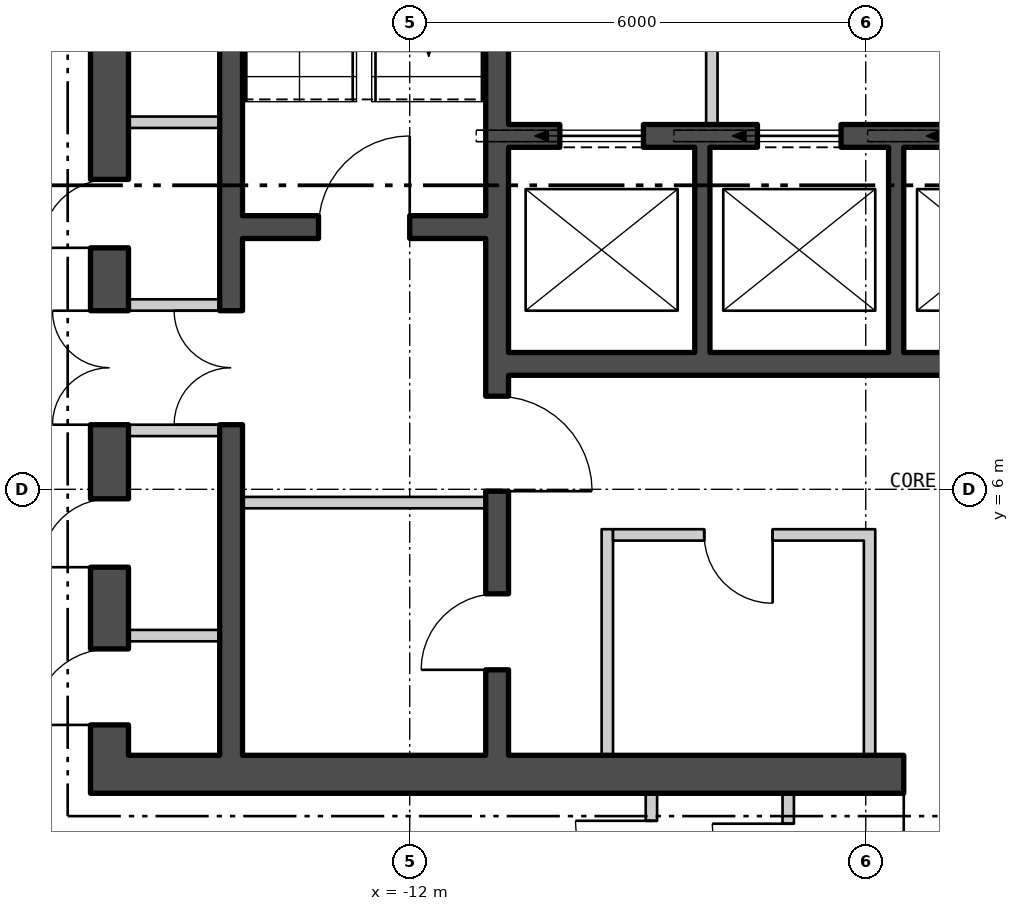
"""IFC4 building model, lengths in metres.
Left out: names, types, materials, properties, quantities, classifications, styles, units other than length and angle.
Written with IfcOpenShell. Run it as: python <this file> out.ifc"""

import sys

from ifc_helpers import new_model, si_unit, direction, frame, frame_2d, origin, place, context, subcontext, project, spatial, polyline, rectangle, outline, extrude, element, fill, save


model = new_model("IFC4")
c1 = context("Model", 3, precision=1e-05, world=origin(), true_north=direction((0.0, 1.0)))
c2 = subcontext(c1, "Body", "Model", "MODEL_VIEW")
j1 = project(units=[si_unit("LENGTHUNIT", "METRE"), si_unit("PLANEANGLEUNIT", "RADIAN")], contexts=[c1])
p1 = place(None, origin())
s1 = spatial("IfcSite", under=j1, at=p1, CompositionType="ELEMENT")
p2 = place(p1, origin())
s2 = spatial("IfcBuilding", under=s1, at=p2, CompositionType="ELEMENT")
p3 = place(p2, frame((0.0, 0.0, 174.9)))
s3 = spatial("IfcBuildingStorey", under=s2, at=p3, CompositionType="ELEMENT", Elevation=174.9)
p4 = place(p3, frame((-26.775, 13.22, -0.18), z_axis=(0.0, 0.0, 1.0), x_axis=(0.500000335318, -0.866025210188, 0.0)))
e1 = element("IfcWall", 1, at=p4, inside=s3, PredefinedType="SOLIDWALL", context=c2, shape_type="SweptSolid", body=[
    extrude(outline(polyline([(-0.13, -0.225), (45.88, -0.225), (45.62, 0.225), (0.13, 0.225), (-0.13, -0.225)])), origin(), (0.0, 0.0, 1.0), 3.68),
])
p5 = place(p4, frame((1.425, 0.0, 1.08)))
e2 = element("IfcOpeningElement", 2, at=p5, cuts=e1, PredefinedType="OPENING", context=c2, shape_type="SweptSolid", body=[
    extrude(rectangle(XDim=2.4, YDim=2.0, at=frame_2d((1.2, 1.0))), frame((0.0, 0.235, 0.0), z_axis=(0.0, -1.0, 0.0), x_axis=(1.0, 0.0, 0.0)), (0.0, 0.0, 1.0), 0.47),
])
p6 = place(p4, frame((5.895, 0.0, 1.08)))
e3 = element("IfcOpeningElement", 3, at=p6, cuts=e1, PredefinedType="OPENING", context=c2, shape_type="SweptSolid", body=[
    extrude(rectangle(XDim=2.4, YDim=2.0, at=frame_2d((1.2, 1.0))), frame((0.0, 0.235, 0.0), z_axis=(0.0, -1.0, 0.0), x_axis=(1.0, 0.0, 0.0)), (0.0, 0.0, 1.0), 0.47),
])
p7 = place(p4, frame((10.403, 0.0, 1.08)))
e4 = element("IfcOpeningElement", 4, at=p7, cuts=e1, PredefinedType="OPENING", context=c2, shape_type="SweptSolid", body=[
    extrude(rectangle(XDim=2.4, YDim=2.0, at=frame_2d((1.2, 1.0))), frame((0.0, 0.235, 0.0), z_axis=(0.0, -1.0, 0.0), x_axis=(1.0, 0.0, 0.0)), (0.0, 0.0, 1.0), 0.47),
])
p8 = place(p4, frame((14.912, 0.0, 1.08)))
e5 = element("IfcOpeningElement", 5, at=p8, cuts=e1, PredefinedType="OPENING", context=c2, shape_type="SweptSolid", body=[
    extrude(rectangle(XDim=2.4, YDim=2.0, at=frame_2d((1.2, 1.0))), frame((0.0, 0.235, 0.0), z_axis=(0.0, -1.0, 0.0), x_axis=(1.0, 0.0, 0.0)), (0.0, 0.0, 1.0), 0.47),
])
p9 = place(p4, frame((19.421, 0.0, 1.08)))
e6 = element("IfcOpeningElement", 6, at=p9, cuts=e1, PredefinedType="OPENING", context=c2, shape_type="SweptSolid", body=[
    extrude(rectangle(XDim=2.4, YDim=2.0, at=frame_2d((1.2, 1.0))), frame((0.0, 0.235, 0.0), z_axis=(0.0, -1.0, 0.0), x_axis=(1.0, 0.0, 0.0)), (0.0, 0.0, 1.0), 0.47),
])
p10 = place(p4, frame((23.929, 0.0, 1.08)))
e7 = element("IfcOpeningElement", 7, at=p10, cuts=e1, PredefinedType="OPENING", context=c2, shape_type="SweptSolid", body=[
    extrude(rectangle(XDim=2.4, YDim=2.0, at=frame_2d((1.2, 1.0))), frame((0.0, 0.235, 0.0), z_axis=(0.0, -1.0, 0.0), x_axis=(1.0, 0.0, 0.0)), (0.0, 0.0, 1.0), 0.47),
])
p11 = place(p4, frame((28.438, 0.0, 1.08)))
e8 = element("IfcOpeningElement", 8, at=p11, cuts=e1, PredefinedType="OPENING", context=c2, shape_type="SweptSolid", body=[
    extrude(rectangle(XDim=2.4, YDim=2.0, at=frame_2d((1.2, 1.0))), frame((0.0, 0.235, 0.0), z_axis=(0.0, -1.0, 0.0), x_axis=(1.0, 0.0, 0.0)), (0.0, 0.0, 1.0), 0.47),
])
p12 = place(p4, frame((32.947, 0.0, 1.08)))
e9 = element("IfcOpeningElement", 9, at=p12, cuts=e1, PredefinedType="OPENING", context=c2, shape_type="SweptSolid", body=[
    extrude(rectangle(XDim=2.4, YDim=2.0, at=frame_2d((1.2, 1.0))), frame((0.0, 0.235, 0.0), z_axis=(0.0, -1.0, 0.0), x_axis=(1.0, 0.0, 0.0)), (0.0, 0.0, 1.0), 0.47),
])
p13 = place(p4, frame((37.455, 0.0, 1.08)))
e10 = element("IfcOpeningElement", 10, at=p13, cuts=e1, PredefinedType="OPENING", context=c2, shape_type="SweptSolid", body=[
    extrude(rectangle(XDim=2.4, YDim=2.0, at=frame_2d((1.2, 1.0))), frame((0.0, 0.235, 0.0), z_axis=(0.0, -1.0, 0.0), x_axis=(1.0, 0.0, 0.0)), (0.0, 0.0, 1.0), 0.47),
])
p14 = place(p4, frame((41.925, 0.0, 1.08)))
e11 = element("IfcOpeningElement", 11, at=p14, cuts=e1, PredefinedType="OPENING", context=c2, shape_type="SweptSolid", body=[
    extrude(rectangle(XDim=2.4, YDim=2.0, at=frame_2d((1.2, 1.0))), frame((0.0, 0.235, 0.0), z_axis=(0.0, -1.0, 0.0), x_axis=(1.0, 0.0, 0.0)), (0.0, 0.0, 1.0), 0.47),
])
p15 = place(p3, frame((-16.2, 2.25, 0.0), z_axis=(0.0, 0.0, 1.0), x_axis=(1.0, 0.0, 0.0)))
e12 = element("IfcWall", 12, at=p15, inside=s3, PredefinedType="SHEAR", context=c2, shape_type="SweptSolid", body=[
    extrude(rectangle(XDim=32.4, YDim=0.5, at=frame_2d((16.2, 0.0))), origin(), (0.0, 0.0, 1.0), 3.7),
])
p16 = place(p15, frame((10.7, 0.0, 0.0)))
e13 = element("IfcOpeningElement", 13, at=p16, cuts=e12, PredefinedType="OPENING", context=c2, shape_type="SweptSolid", body=[
    extrude(rectangle(XDim=1.8, YDim=2.4, at=frame_2d((0.9, 1.2))), frame((0.0, 0.26, 0.0), z_axis=(0.0, -1.0, 0.0), x_axis=(1.0, 0.0, 0.0)), (0.0, 0.0, 1.0), 0.52),
])
p17 = place(p15, frame((20.7, 0.0, 0.0)))
e14 = element("IfcOpeningElement", 14, at=p17, cuts=e12, PredefinedType="OPENING", context=c2, shape_type="SweptSolid", body=[
    extrude(rectangle(XDim=1.8, YDim=2.4, at=frame_2d((0.9, 1.2))), frame((0.0, 0.26, 0.0), z_axis=(0.0, -1.0, 0.0), x_axis=(1.0, 0.0, 0.0)), (0.0, 0.0, 1.0), 0.52),
])
p18 = place(p3, frame((-15.95, 2.5, 0.0), z_axis=(0.0, 0.0, 1.0), x_axis=(0.0, 1.0, 0.0)))
e15 = element("IfcWall", 15, at=p18, inside=s3, PredefinedType="SHEAR", context=c2, shape_type="SweptSolid", body=[
    extrude(rectangle(XDim=15.0, YDim=0.5, at=frame_2d((7.5, 0.0))), origin(), (0.0, 0.0, 1.0), 3.7),
])
p19 = place(p18, frame((4.35, 0.0, 0.0)))
e16 = element("IfcOpeningElement", 16, at=p19, cuts=e15, PredefinedType="OPENING", context=c2, shape_type="SweptSolid", body=[
    extrude(rectangle(XDim=1.5, YDim=2.1, at=frame_2d((0.75, 1.05))), frame((0.0, 0.26, 0.0), z_axis=(0.0, -1.0, 0.0), x_axis=(1.0, 0.0, 0.0)), (0.0, 0.0, 1.0), 0.52),
])
p20 = place(p18, frame((0.4, 0.0, 0.0)))
e17 = element("IfcOpeningElement", 17, at=p20, cuts=e15, PredefinedType="OPENING", context=c2, shape_type="SweptSolid", body=[
    extrude(rectangle(XDim=1.0, YDim=2.1, at=frame_2d((0.5, 1.05))), frame((0.0, 0.26, 0.0), z_axis=(0.0, -1.0, 0.0), x_axis=(1.0, 0.0, 0.0)), (0.0, 0.0, 1.0), 0.52),
])
p21 = place(p18, frame((2.475, 0.0, 0.0)))
e18 = element("IfcOpeningElement", 18, at=p21, cuts=e15, PredefinedType="OPENING", context=c2, shape_type="SweptSolid", body=[
    extrude(rectangle(XDim=0.9, YDim=2.1, at=frame_2d((0.45, 1.05))), frame((0.0, 0.26, 0.0), z_axis=(0.0, -1.0, 0.0), x_axis=(1.0, 0.0, 0.0)), (0.0, 0.0, 1.0), 0.52),
])
p22 = place(p18, frame((6.677, 0.0, 0.0)))
e19 = element("IfcOpeningElement", 19, at=p22, cuts=e15, PredefinedType="OPENING", context=c2, shape_type="SweptSolid", body=[
    extrude(rectangle(XDim=0.9, YDim=2.1, at=frame_2d((0.45, 1.05))), frame((0.0, 0.26, 0.0), z_axis=(0.0, -1.0, 0.0), x_axis=(1.0, 0.0, 0.0)), (0.0, 0.0, 1.0), 0.52),
])
p23 = place(p18, frame((11.252, 0.0, 0.0)))
e20 = element("IfcOpeningElement", 20, at=p23, cuts=e15, PredefinedType="OPENING", context=c2, shape_type="SweptSolid", body=[
    extrude(rectangle(XDim=0.9, YDim=2.1, at=frame_2d((0.45, 1.05))), frame((0.0, 0.26, 0.0), z_axis=(0.0, -1.0, 0.0), x_axis=(1.0, 0.0, 0.0)), (0.0, 0.0, 1.0), 0.52),
])
p24 = place(p3, frame((-10.85, 2.5, 0.0), z_axis=(0.0, 0.0, 1.0), x_axis=(0.0, 1.0, 0.0)))
e21 = element("IfcWall", 21, at=p24, inside=s3, PredefinedType="SHEAR", context=c2, shape_type="SweptSolid", body=[
    extrude(rectangle(XDim=15.0, YDim=0.3, at=frame_2d((7.5, 0.0))), origin(), (0.0, 0.0, 1.0), 3.7),
])
p25 = place(p24, frame((3.475, 0.0, 0.0)))
e22 = element("IfcOpeningElement", 22, at=p25, cuts=e21, PredefinedType="OPENING", context=c2, shape_type="SweptSolid", body=[
    extrude(rectangle(XDim=1.25, YDim=2.1, at=frame_2d((0.625, 1.05))), frame((0.0, 0.16, 0.0), z_axis=(0.0, -1.0, 0.0), x_axis=(1.0, 0.0, 0.0)), (0.0, 0.0, 1.0), 0.32),
])
p26 = place(p24, frame((1.125, 0.0, 0.0)))
e23 = element("IfcOpeningElement", 23, at=p26, cuts=e21, PredefinedType="OPENING", context=c2, shape_type="SweptSolid", body=[
    extrude(rectangle(XDim=1.0, YDim=2.1, at=frame_2d((0.5, 1.05))), frame((0.0, 0.16, 0.0), z_axis=(0.0, -1.0, 0.0), x_axis=(1.0, 0.0, 0.0)), (0.0, 0.0, 1.0), 0.32),
])
p27 = place(p3, frame((-14.35, 2.5, 0.0), z_axis=(0.0, 0.0, 1.0), x_axis=(0.0, 1.0, 0.0)))
e24 = element("IfcWall", 24, at=p27, inside=s3, PredefinedType="SHEAR", context=c2, shape_type="SweptSolid", body=[
    extrude(rectangle(XDim=15.0, YDim=0.3, at=frame_2d((7.5, 0.0))), origin(), (0.0, 0.0, 1.0), 3.7),
])
p28 = place(p27, frame((4.35, 0.0, 0.0)))
e25 = element("IfcOpeningElement", 25, at=p28, cuts=e24, PredefinedType="OPENING", context=c2, shape_type="SweptSolid", body=[
    extrude(rectangle(XDim=1.5, YDim=2.1, at=frame_2d((0.75, 1.05))), frame((0.0, 0.16, 0.0), z_axis=(0.0, -1.0, 0.0), x_axis=(1.0, 0.0, 0.0)), (0.0, 0.0, 1.0), 0.32),
])
p29 = place(p3, frame((-14.2, 9.45, 0.0), z_axis=(0.0, 0.0, 1.0), x_axis=(1.0, 0.0, 0.0)))
e26 = element("IfcWall", 26, at=p29, inside=s3, PredefinedType="SHEAR", context=c2, shape_type="SweptSolid", body=[
    extrude(rectangle(XDim=3.2, YDim=0.3, at=frame_2d((1.6, 0.0))), origin(), (0.0, 0.0, 1.0), 3.7),
])
p30 = place(p29, frame((1.0, 0.0, 0.0)))
e27 = element("IfcOpeningElement", 27, at=p30, cuts=e26, PredefinedType="OPENING", context=c2, shape_type="SweptSolid", body=[
    extrude(rectangle(XDim=1.2, YDim=2.1, at=frame_2d((0.6, 1.05))), frame((0.0, 0.16, 0.0), z_axis=(0.0, -1.0, 0.0), x_axis=(1.0, 0.0, 0.0)), (0.0, 0.0, 1.0), 0.32),
])
p31 = place(p3, frame((-10.7, 10.65, 0.0), z_axis=(0.0, 0.0, 1.0), x_axis=(1.0, 0.0, 0.0)))
e28 = element("IfcWall", 28, at=p31, inside=s3, PredefinedType="SHEAR", context=c2, shape_type="SweptSolid", body=[
    extrude(rectangle(XDim=10.3, YDim=0.3, at=frame_2d((5.15, 0.0))), origin(), (0.0, 0.0, 1.0), 3.7),
])
p32 = place(p31, frame((0.675, 0.0, 0.0)))
e29 = element("IfcOpeningElement", 29, at=p32, cuts=e28, PredefinedType="OPENING", context=c2, shape_type="SweptSolid", body=[
    extrude(rectangle(XDim=1.1, YDim=2.1, at=frame_2d((0.55, 1.05))), frame((0.0, 0.16, 0.0), z_axis=(0.0, -1.0, 0.0), x_axis=(1.0, 0.0, 0.0)), (0.0, 0.0, 1.0), 0.32),
])
p33 = place(p31, frame((3.275, 0.0, 0.0)))
e30 = element("IfcOpeningElement", 30, at=p33, cuts=e28, PredefinedType="OPENING", context=c2, shape_type="SweptSolid", body=[
    extrude(rectangle(XDim=1.1, YDim=2.1, at=frame_2d((0.55, 1.05))), frame((0.0, 0.16, 0.0), z_axis=(0.0, -1.0, 0.0), x_axis=(1.0, 0.0, 0.0)), (0.0, 0.0, 1.0), 0.32),
])
p34 = place(p31, frame((5.825, 0.0, 0.0)))
e31 = element("IfcOpeningElement", 31, at=p34, cuts=e28, PredefinedType="OPENING", context=c2, shape_type="SweptSolid", body=[
    extrude(rectangle(XDim=1.1, YDim=2.1, at=frame_2d((0.55, 1.05))), frame((0.0, 0.16, 0.0), z_axis=(0.0, -1.0, 0.0), x_axis=(1.0, 0.0, 0.0)), (0.0, 0.0, 1.0), 0.32),
])
p35 = place(p31, frame((8.425, 0.0, 0.0)))
e32 = element("IfcOpeningElement", 32, at=p35, cuts=e28, PredefinedType="OPENING", context=c2, shape_type="SweptSolid", body=[
    extrude(rectangle(XDim=1.0, YDim=2.1, at=frame_2d((0.5, 1.05))), frame((0.0, 0.16, 0.0), z_axis=(0.0, -1.0, 0.0), x_axis=(1.0, 0.0, 0.0)), (0.0, 0.0, 1.0), 0.32),
])
p36 = place(p3, frame((-10.7, 7.65, 0.0), z_axis=(0.0, 0.0, 1.0), x_axis=(1.0, 0.0, 0.0)))
e33 = element("IfcWall", 33, at=p36, inside=s3, PredefinedType="SHEAR", context=c2, shape_type="SweptSolid", body=[
    extrude(rectangle(XDim=10.3, YDim=0.3, at=frame_2d((5.15, 0.0))), origin(), (0.0, 0.0, 1.0), 3.7),
])
for number, where, z_axis, x_axis in (
    (34, (-8.15, 7.8, 0.0), (0.0, 0.0, 1.0), (0.0, 1.0, 0.0)),
    (35, (-5.6, 7.8, 0.0), (0.0, 0.0, 1.0), (0.0, 1.0, 0.0)),
):
    element("IfcWall", number, at=place(p3, frame(where, z_axis=z_axis, x_axis=x_axis)), inside=s3, PredefinedType="SHEAR", context=c2, shape_type="SweptSolid", body=[
        extrude(rectangle(XDim=2.7, YDim=0.2, at=frame_2d((1.35, 0.0))), origin(), (0.0, 0.0, 1.0), 3.7),
    ])
p37 = place(p3, frame((-8.025, 10.8, 0.0), z_axis=(0.0, 0.0, 1.0), x_axis=(0.0, 1.0, 0.0)))
e36 = element("IfcWall", 36, at=p37, inside=s3, PredefinedType="PARTITIONING", context=c2, shape_type="SweptSolid", body=[
    extrude(rectangle(XDim=3.6, YDim=0.15, at=frame_2d((1.8, 0.0))), origin(), (0.0, 0.0, 1.0), 3.7),
])
p38 = place(p37, frame((1.175, 0.0, 0.0)))
e37 = element("IfcOpeningElement", 37, at=p38, cuts=e36, PredefinedType="OPENING", context=c2, shape_type="SweptSolid", body=[
    extrude(rectangle(XDim=1.25, YDim=2.1, at=frame_2d((0.625, 1.05))), frame((0.0, 0.085, 0.0), z_axis=(0.0, -1.0, 0.0), x_axis=(1.0, 0.0, 0.0)), (0.0, 0.0, 1.0), 0.17),
])
p39 = place(p3, frame((-14.2, 5.825, 0.0), z_axis=(0.0, 0.0, 1.0), x_axis=(1.0, 0.0, 0.0)))
e38 = element("IfcWall", 38, at=p39, inside=s3, PredefinedType="PARTITIONING", context=c2, shape_type="SweptSolid", body=[
    extrude(rectangle(XDim=3.2, YDim=0.15, at=frame_2d((1.6, 0.0))), origin(), (0.0, 0.0, 1.0), 3.7),
])
for number, where, z_axis, x_axis in (
    (39, (-15.7, 6.775, 0.0), (0.0, 0.0, 1.0), (1.0, 0.0, 0.0)),
    (40, (-15.7, 8.425, 0.0), (0.0, 0.0, 1.0), (1.0, 0.0, 0.0)),
    (41, (-15.7, 4.075, 0.0), (0.0, 0.0, 1.0), (1.0, 0.0, 0.0)),
    (42, (-15.7, 10.829, 0.0), (0.0, 0.0, 1.0), (1.0, 0.0, 0.0)),
):
    element("IfcWall", number, at=place(p3, frame(where, z_axis=z_axis, x_axis=x_axis)), inside=s3, PredefinedType="PARTITIONING", context=c2, shape_type="SweptSolid", body=[
        extrude(rectangle(XDim=1.2, YDim=0.15, at=frame_2d((0.6, 0.0))), origin(), (0.0, 0.0, 1.0), 3.7),
    ])
for number, where, z_axis, x_axis in (
    (43, (-9.4, 2.5, 0.0), (0.0, 0.0, 1.0), (0.0, 1.0, 0.0)),
    (44, (-5.95, 2.5, 0.0), (0.0, 0.0, 1.0), (0.0, 1.0, 0.0)),
):
    element("IfcWall", number, at=place(p3, frame(where, z_axis=z_axis, x_axis=x_axis)), inside=s3, PredefinedType="PARTITIONING", context=c2, shape_type="SweptSolid", body=[
        extrude(rectangle(XDim=2.975, YDim=0.15, at=frame_2d((1.488, 0.0))), origin(), (0.0, 0.0, 1.0), 3.7),
    ])
p40 = place(p3, frame((-9.325, 5.4, 0.0), z_axis=(0.0, 0.0, 1.0), x_axis=(1.0, 0.0, 0.0)))
e45 = element("IfcWall", 45, at=p40, inside=s3, PredefinedType="PARTITIONING", context=c2, shape_type="SweptSolid", body=[
    extrude(rectangle(XDim=3.3, YDim=0.15, at=frame_2d((1.65, 0.0))), origin(), (0.0, 0.0, 1.0), 3.7),
])
p41 = place(p40, frame((1.2, 0.0, 0.0)))
e46 = element("IfcOpeningElement", 46, at=p41, cuts=e45, PredefinedType="OPENING", context=c2, shape_type="SweptSolid", body=[
    extrude(rectangle(XDim=0.9, YDim=2.1, at=frame_2d((0.45, 1.05))), frame((0.0, 0.085, 0.0), z_axis=(0.0, -1.0, 0.0), x_axis=(1.0, 0.0, 0.0)), (0.0, 0.0, 1.0), 0.17),
])
p42 = place(p3, frame((-8.82, 0.275, 0.0), z_axis=(0.0, 0.0, 1.0), x_axis=(0.0, 1.0, 0.0)))
e47 = element("IfcWall", 47, at=p42, inside=s3, PredefinedType="PARTITIONING", context=c2, shape_type="SweptSolid", body=[
    extrude(rectangle(XDim=1.725, YDim=0.15, at=frame_2d((0.863, 0.0))), origin(), (0.0, 0.0, 1.0), 3.7),
])
p43 = place(p42, frame((0.363, 0.0, 0.0)))
e48 = element("IfcOpeningElement", 48, at=p43, cuts=e47, PredefinedType="OPENING", context=c2, shape_type="SweptSolid", body=[
    extrude(rectangle(XDim=1.0, YDim=2.1, at=frame_2d((0.5, 1.05))), frame((0.0, 0.085, 0.0), z_axis=(0.0, -1.0, 0.0), x_axis=(1.0, 0.0, 0.0)), (0.0, 0.0, 1.0), 0.17),
])
p44 = place(p3, frame((-7.02, 0.2, 0.0), z_axis=(0.0, 0.0, 1.0), x_axis=(0.0, 1.0, 0.0)))
e49 = element("IfcWall", 49, at=p44, inside=s3, PredefinedType="PARTITIONING", context=c2, shape_type="SweptSolid", body=[
    extrude(rectangle(XDim=1.8, YDim=0.15, at=frame_2d((0.9, 0.0))), origin(), (0.0, 0.0, 1.0), 3.7),
])
p45 = place(p44, frame((0.4, 0.0, 0.0)))
e50 = element("IfcOpeningElement", 50, at=p45, cuts=e49, PredefinedType="OPENING", context=c2, shape_type="SweptSolid", body=[
    extrude(rectangle(XDim=1.0, YDim=2.1, at=frame_2d((0.5, 1.05))), frame((0.0, 0.085, 0.0), z_axis=(0.0, -1.0, 0.0), x_axis=(1.0, 0.0, 0.0)), (0.0, 0.0, 1.0), 0.17),
])
p46 = place(p32, origin())
e51 = element("IfcDoor", 51, at=p46, inside=s3, OperationType="SLIDING_TO_LEFT", PredefinedType="DOOR", context=c2, shape_type="SweptSolid", body=[
    extrude(rectangle(XDim=1.1, YDim=2.1, at=frame_2d((0.55, 1.05))), frame((0.0, 0.025, 0.0), z_axis=(0.0, -1.0, 0.0), x_axis=(1.0, 0.0, 0.0)), (0.0, 0.0, 1.0), 0.05),
])
fill(e29, e51)
p47 = place(p33, origin())
e52 = element("IfcDoor", 52, at=p47, inside=s3, OperationType="SLIDING_TO_LEFT", PredefinedType="DOOR", context=c2, shape_type="SweptSolid", body=[
    extrude(rectangle(XDim=1.1, YDim=2.1, at=frame_2d((0.55, 1.05))), frame((0.0, 0.025, 0.0), z_axis=(0.0, -1.0, 0.0), x_axis=(1.0, 0.0, 0.0)), (0.0, 0.0, 1.0), 0.05),
])
fill(e30, e52)
p48 = place(p30, origin())
e53 = element("IfcDoor", 53, at=p48, inside=s3, OperationType="SINGLE_SWING_LEFT", PredefinedType="DOOR", context=c2, shape_type="SweptSolid", body=[
    extrude(rectangle(XDim=1.2, YDim=2.1, at=frame_2d((0.6, 1.05))), frame((0.0, 0.025, 0.0), z_axis=(0.0, -1.0, 0.0), x_axis=(1.0, 0.0, 0.0)), (0.0, 0.0, 1.0), 0.05),
])
fill(e27, e53)
p49 = place(p25, origin())
e54 = element("IfcDoor", 54, at=p49, inside=s3, OperationType="SINGLE_SWING_LEFT", PredefinedType="DOOR", context=c2, shape_type="SweptSolid", body=[
    extrude(rectangle(XDim=1.25, YDim=2.1, at=frame_2d((0.625, 1.05))), frame((0.0, 0.025, 0.0), z_axis=(0.0, -1.0, 0.0), x_axis=(1.0, 0.0, 0.0)), (0.0, 0.0, 1.0), 0.05),
])
fill(e22, e54)
p50 = place(p26, origin())
e55 = element("IfcDoor", 55, at=p50, inside=s3, OperationType="SINGLE_SWING_RIGHT", PredefinedType="DOOR", context=c2, shape_type="SweptSolid", body=[
    extrude(rectangle(XDim=1.0, YDim=2.1, at=frame_2d((0.5, 1.05))), frame((0.0, 0.025, 0.0), z_axis=(0.0, -1.0, 0.0), x_axis=(1.0, 0.0, 0.0)), (0.0, 0.0, 1.0), 0.05),
])
fill(e23, e55)
p51 = place(p28, origin())
e56 = element("IfcDoor", 56, at=p51, inside=s3, OperationType="DOUBLE_DOOR_SINGLE_SWING", PredefinedType="DOOR", context=c2, shape_type="SweptSolid", body=[
    extrude(rectangle(XDim=1.5, YDim=2.1, at=frame_2d((0.75, 1.05))), frame((0.0, 0.025, 0.0), z_axis=(0.0, -1.0, 0.0), x_axis=(1.0, 0.0, 0.0)), (0.0, 0.0, 1.0), 0.05),
])
fill(e25, e56)
p52 = place(p19, origin())
e57 = element("IfcDoor", 57, at=p52, inside=s3, OperationType="DOUBLE_DOOR_SINGLE_SWING", PredefinedType="DOOR", context=c2, shape_type="SweptSolid", body=[
    extrude(rectangle(XDim=1.5, YDim=2.1, at=frame_2d((0.75, 1.05))), frame((0.0, 0.025, 0.0), z_axis=(0.0, -1.0, 0.0), x_axis=(1.0, 0.0, 0.0)), (0.0, 0.0, 1.0), 0.05),
])
fill(e16, e57)
p53 = place(p20, origin())
e58 = element("IfcDoor", 58, at=p53, inside=s3, OperationType="SINGLE_SWING_RIGHT", PredefinedType="DOOR", context=c2, shape_type="SweptSolid", body=[
    extrude(rectangle(XDim=1.0, YDim=2.1, at=frame_2d((0.5, 1.05))), frame((0.0, 0.025, 0.0), z_axis=(0.0, -1.0, 0.0), x_axis=(1.0, 0.0, 0.0)), (0.0, 0.0, 1.0), 0.05),
])
fill(e17, e58)
p54 = place(p21, origin())
e59 = element("IfcDoor", 59, at=p54, inside=s3, OperationType="SINGLE_SWING_RIGHT", PredefinedType="DOOR", context=c2, shape_type="SweptSolid", body=[
    extrude(rectangle(XDim=0.9, YDim=2.1, at=frame_2d((0.45, 1.05))), frame((0.0, 0.025, 0.0), z_axis=(0.0, -1.0, 0.0), x_axis=(1.0, 0.0, 0.0)), (0.0, 0.0, 1.0), 0.05),
])
fill(e18, e59)
p55 = place(p22, origin())
e60 = element("IfcDoor", 60, at=p55, inside=s3, OperationType="SINGLE_SWING_RIGHT", PredefinedType="DOOR", context=c2, shape_type="SweptSolid", body=[
    extrude(rectangle(XDim=0.9, YDim=2.1, at=frame_2d((0.45, 1.05))), frame((0.0, 0.025, 0.0), z_axis=(0.0, -1.0, 0.0), x_axis=(1.0, 0.0, 0.0)), (0.0, 0.0, 1.0), 0.05),
])
fill(e19, e60)
p56 = place(p41, origin())
e61 = element("IfcDoor", 61, at=p56, inside=s3, OperationType="SINGLE_SWING_RIGHT", PredefinedType="DOOR", context=c2, shape_type="SweptSolid", body=[
    extrude(rectangle(XDim=0.9, YDim=2.1, at=frame_2d((0.45, 1.05))), frame((0.0, 0.025, 0.0), z_axis=(0.0, -1.0, 0.0), x_axis=(1.0, 0.0, 0.0)), (0.0, 0.0, 1.0), 0.05),
])
fill(e46, e61)
p57 = place(p16, origin())
e62 = element("IfcDoor", 62, at=p57, inside=s3, OperationType="DOUBLE_DOOR_SINGLE_SWING", PredefinedType="DOOR", context=c2, shape_type="SweptSolid", body=[
    extrude(rectangle(XDim=1.8, YDim=2.4, at=frame_2d((0.9, 1.2))), frame((0.0, 0.025, 0.0), z_axis=(0.0, -1.0, 0.0), x_axis=(1.0, 0.0, 0.0)), (0.0, 0.0, 1.0), 0.05),
])
fill(e13, e62)
p58 = place(p43, origin())
e63 = element("IfcDoor", 63, at=p58, inside=s3, OperationType="SINGLE_SWING_LEFT", PredefinedType="DOOR", context=c2, shape_type="SweptSolid", body=[
    extrude(rectangle(XDim=1.0, YDim=2.1, at=frame_2d((0.5, 1.05))), frame((0.0, 0.025, 0.0), z_axis=(0.0, -1.0, 0.0), x_axis=(1.0, 0.0, 0.0)), (0.0, 0.0, 1.0), 0.05),
])
fill(e48, e63)
p59 = place(p45, origin())
e64 = element("IfcDoor", 64, at=p59, inside=s3, OperationType="SINGLE_SWING_LEFT", PredefinedType="DOOR", context=c2, shape_type="SweptSolid", body=[
    extrude(rectangle(XDim=1.0, YDim=2.1, at=frame_2d((0.5, 1.05))), frame((0.0, 0.025, 0.0), z_axis=(0.0, -1.0, 0.0), x_axis=(1.0, 0.0, 0.0)), (0.0, 0.0, 1.0), 0.05),
])
fill(e50, e64)
save(model, sys.argv[1])
